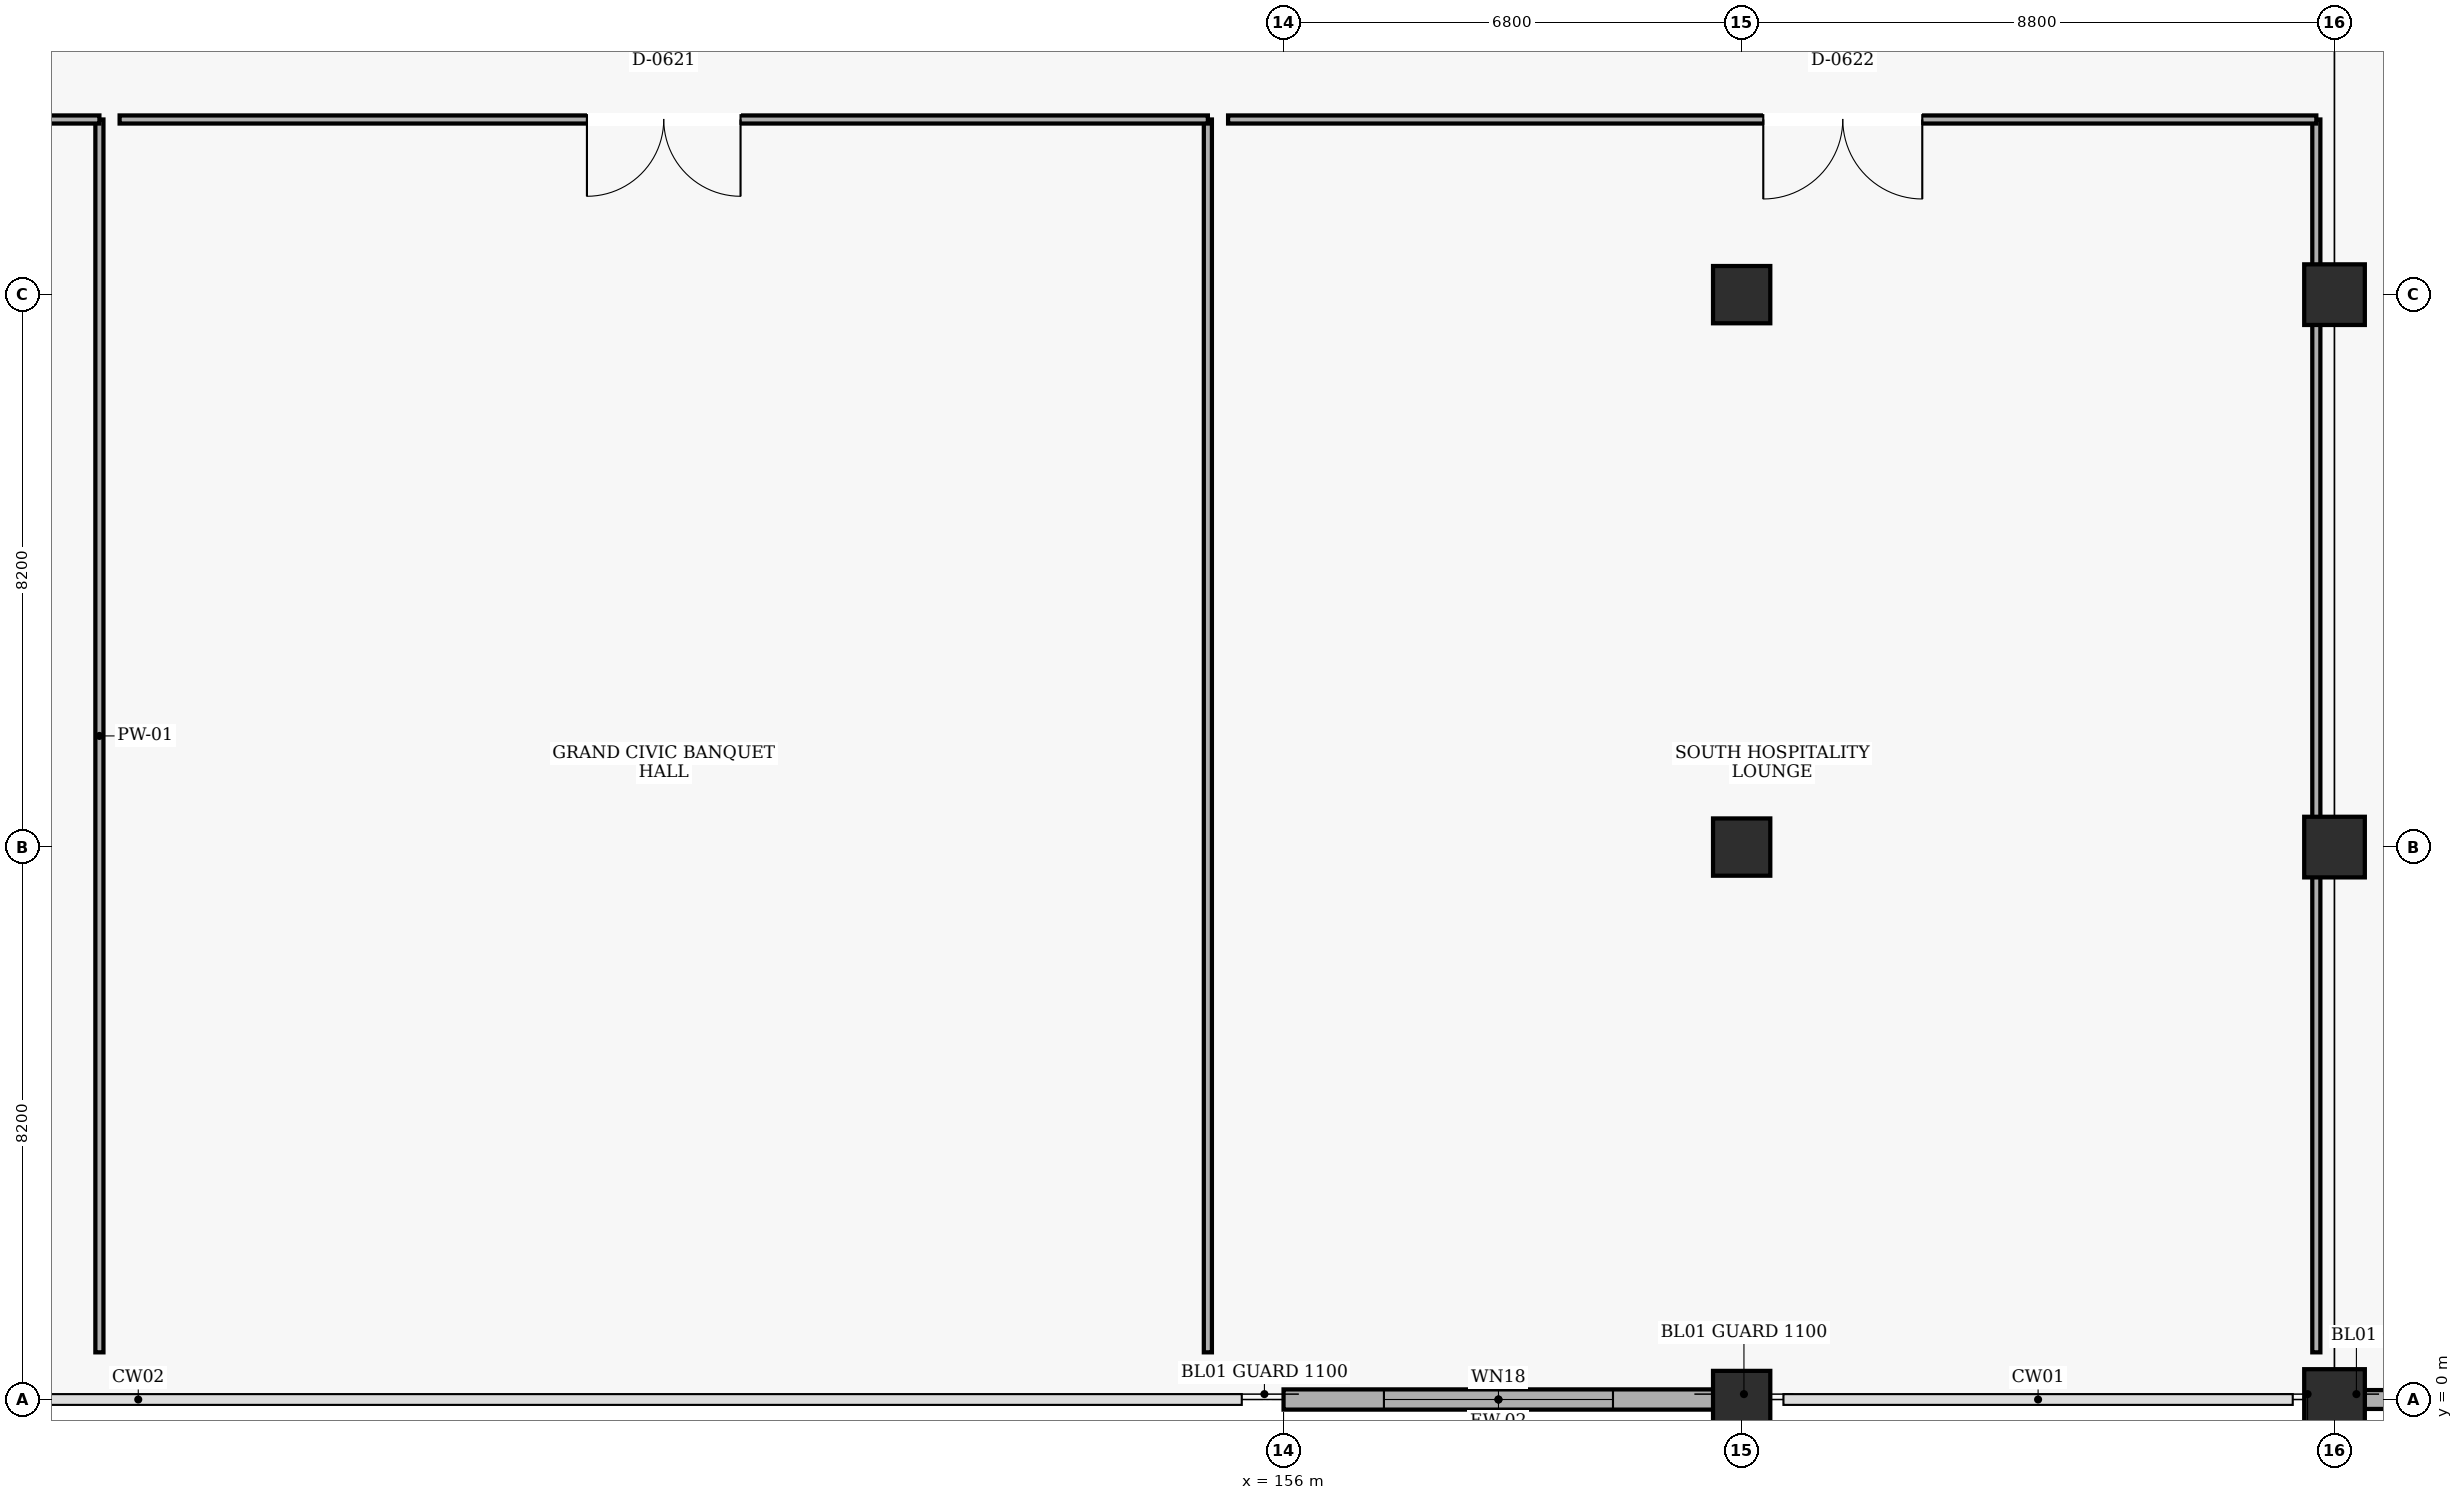
"""IFC4 building model, lengths in metres.
Left out: names, types, materials, properties, quantities, classifications, styles, units other than length and angle.
Written with IfcOpenShell. Run it as: python <this file> out.ifc"""

import sys

from ifc_helpers import new_model, si_unit, direction, frame, frame_2d, origin, origin_2d, place, context, subcontext, project, spatial, rectangle, extrude, element, fill, save


model = new_model("IFC4")
c1 = context("Model", 3, precision=1e-05, world=origin(), true_north=direction((0.0, 1.0)))
c2 = subcontext(c1, "Body", "Model", "MODEL_VIEW")
j1 = project(units=[si_unit("LENGTHUNIT", "METRE"), si_unit("PLANEANGLEUNIT", "RADIAN")], contexts=[c1])
p1 = place(None, origin())
s1 = spatial("IfcSite", under=j1, at=p1, CompositionType="ELEMENT")
p2 = place(p1, origin())
s2 = spatial("IfcBuilding", under=s1, at=p2, CompositionType="ELEMENT")
p3 = place(p2, frame((0.0, 0.0, 10.2)))
s3 = spatial("IfcBuildingStorey", under=s2, at=p3, CompositionType="ELEMENT", Elevation=10.2)
for number, where, z_axis, x_axis in (
    (1, (162.8, 0.0, 0.0), (0.0, 0.0, 1.0), (1.0, 0.0, 0.0)),
    (2, (162.8, 8.2, 0.0), (0.0, 0.0, 1.0), (1.0, 0.0, 0.0)),
    (3, (162.8, 16.4, 0.0), (0.0, 0.0, 1.0), (1.0, 0.0, 0.0)),
):
    element("IfcColumn", number, at=place(p3, frame(where, z_axis=z_axis, x_axis=x_axis)), inside=s3, PredefinedType="COLUMN", context=c2, shape_type="SweptSolid", body=[
        extrude(rectangle(XDim=0.85, YDim=0.85, at=origin_2d()), origin(), (0.0, 0.0, 1.0), 4.8),
    ])
for number, where, z_axis, x_axis in (
    (4, (171.6, 0.0, 0.0), (0.0, 0.0, 1.0), (1.0, 0.0, 0.0)),
    (5, (171.6, 8.2, 0.0), (0.0, 0.0, 1.0), (1.0, 0.0, 0.0)),
    (6, (171.6, 16.4, 0.0), (0.0, 0.0, 1.0), (1.0, 0.0, 0.0)),
):
    element("IfcColumn", number, at=place(p3, frame(where, z_axis=z_axis, x_axis=x_axis)), inside=s3, PredefinedType="COLUMN", context=c2, shape_type="SweptSolid", body=[
        extrude(rectangle(XDim=0.9, YDim=0.9, at=origin_2d()), origin(), (0.0, 0.0, 1.0), 4.8),
    ])
p4 = place(p3, frame((179.905, 0.0, 0.0), z_axis=(0.0, 0.0, 1.0), x_axis=(-1.0, 0.0, 0.0)))
e7 = element("IfcWall", 7, at=p4, inside=s3, PredefinedType="SOLIDWALL", context=c2, shape_type="SweptSolid", body=[
    extrude(rectangle(XDim=7.86, YDim=0.28, at=frame_2d((3.93, 0.0))), origin(), (0.0, 0.0, 1.0), 3.86),
])
p5 = place(p4, frame((2.43, 0.0, 0.9)))
e8 = element("IfcOpeningElement", 8, at=p5, cuts=e7, PredefinedType="OPENING", context=c2, shape_type="SweptSolid", body=[
    extrude(rectangle(XDim=3.0, YDim=2.1, at=frame_2d((1.5, 1.05))), frame((0.0, 0.15, 0.0), z_axis=(0.0, -1.0, 0.0), x_axis=(1.0, 0.0, 0.0)), (0.0, 0.0, 1.0), 0.3),
])
p6 = place(p3, frame((162.38, 0.0, 0.0), z_axis=(0.0, 0.0, 1.0), x_axis=(-1.0, 0.0, 0.0)))
e9 = element("IfcWall", 9, at=p6, inside=s3, PredefinedType="SOLIDWALL", context=c2, shape_type="SweptSolid", body=[
    extrude(rectangle(XDim=6.38, YDim=0.3, at=frame_2d((3.19, 0.0))), origin(), (0.0, 0.0, 1.0), 4.48),
])
p7 = place(p6, frame((1.49, 0.0, 0.9)))
e10 = element("IfcOpeningElement", 10, at=p7, cuts=e9, PredefinedType="OPENING", context=c2, shape_type="SweptSolid", body=[
    extrude(rectangle(XDim=3.4, YDim=2.1, at=frame_2d((1.7, 1.05))), frame((0.0, 0.16, 0.0), z_axis=(0.0, -1.0, 0.0), x_axis=(1.0, 0.0, 0.0)), (0.0, 0.0, 1.0), 0.32),
])
p8 = place(p3, frame((138.423, 0.7, 0.0), z_axis=(0.0, 0.0, 1.0), x_axis=(0.0, 1.0, 0.0)))
e11 = element("IfcWall", 11, at=p8, inside=s3, PredefinedType="PARTITIONING", context=c2, shape_type="SweptSolid", body=[
    extrude(rectangle(XDim=18.3, YDim=0.12, at=frame_2d((9.15, 0.0))), origin(), (0.0, 0.0, 1.0), 4.48),
])
p9 = place(p3, frame((138.423, 19.0, 0.0), z_axis=(0.0, 0.0, 1.0), x_axis=(-1.0, 0.0, 0.0)))
e12 = element("IfcWall", 12, at=p9, inside=s3, PredefinedType="PARTITIONING", context=c2, shape_type="SweptSolid", body=[
    extrude(rectangle(XDim=16.153, YDim=0.12, at=frame_2d((8.077, 0.0))), origin(), (0.0, 0.0, 1.0), 4.48),
])
p10 = place(p9, frame((6.997, 0.0, 0.0)))
e13 = element("IfcOpeningElement", 13, at=p10, cuts=e12, PredefinedType="OPENING", context=c2, shape_type="SweptSolid", body=[
    extrude(rectangle(XDim=2.16, YDim=2.35, at=frame_2d((1.08, 1.175))), frame((0.0, 0.07, 0.0), z_axis=(0.0, -1.0, 0.0), x_axis=(1.0, 0.0, 0.0)), (0.0, 0.0, 1.0), 0.14),
])
p11 = place(p3, frame((154.877, 0.7, 0.0), z_axis=(0.0, 0.0, 1.0), x_axis=(0.0, 1.0, 0.0)))
e14 = element("IfcWall", 14, at=p11, inside=s3, PredefinedType="PARTITIONING", context=c2, shape_type="SweptSolid", body=[
    extrude(rectangle(XDim=18.3, YDim=0.12, at=frame_2d((9.15, 0.0))), origin(), (0.0, 0.0, 1.0), 4.48),
])
p12 = place(p3, frame((154.877, 19.0, 0.0), z_axis=(0.0, 0.0, 1.0), x_axis=(-1.0, 0.0, 0.0)))
e15 = element("IfcWall", 15, at=p12, inside=s3, PredefinedType="PARTITIONING", context=c2, shape_type="SweptSolid", body=[
    extrude(rectangle(XDim=16.153, YDim=0.12, at=frame_2d((8.077, 0.0))), origin(), (0.0, 0.0, 1.0), 4.48),
])
p13 = place(p12, frame((6.937, 0.0, 0.0)))
e16 = element("IfcOpeningElement", 16, at=p13, cuts=e15, PredefinedType="OPENING", context=c2, shape_type="SweptSolid", body=[
    extrude(rectangle(XDim=2.28, YDim=2.4, at=frame_2d((1.14, 1.2))), frame((0.0, 0.07, 0.0), z_axis=(0.0, -1.0, 0.0), x_axis=(1.0, 0.0, 0.0)), (0.0, 0.0, 1.0), 0.14),
])
p14 = place(p3, frame((171.33, 0.7, 0.0), z_axis=(0.0, 0.0, 1.0), x_axis=(0.0, 1.0, 0.0)))
e17 = element("IfcWall", 17, at=p14, inside=s3, PredefinedType="PARTITIONING", context=c2, shape_type="SweptSolid", body=[
    extrude(rectangle(XDim=18.3, YDim=0.12, at=frame_2d((9.15, 0.0))), origin(), (0.0, 0.0, 1.0), 3.76),
])
p15 = place(p3, frame((171.33, 19.0, 0.0), z_axis=(0.0, 0.0, 1.0), x_axis=(-1.0, 0.0, 0.0)))
e18 = element("IfcWall", 18, at=p15, inside=s3, PredefinedType="PARTITIONING", context=c2, shape_type="SweptSolid", body=[
    extrude(rectangle(XDim=16.153, YDim=0.12, at=frame_2d((8.077, 0.0))), origin(), (0.0, 0.0, 1.0), 4.48),
])
p16 = place(p15, frame((5.849, 0.0, 0.0)))
e19 = element("IfcOpeningElement", 19, at=p16, cuts=e18, PredefinedType="OPENING", context=c2, shape_type="SweptSolid", body=[
    extrude(rectangle(XDim=2.36, YDim=2.4, at=frame_2d((1.18, 1.2))), frame((0.0, 0.07, 0.0), z_axis=(0.0, -1.0, 0.0), x_axis=(1.0, 0.0, 0.0)), (0.0, 0.0, 1.0), 0.14),
])
p17 = place(p7, origin())
e20 = element("IfcWindow", 20, at=p17, inside=s3, PartitioningType="SINGLE_PANEL", PredefinedType="WINDOW", context=c2, shape_type="SweptSolid", body=[
    extrude(rectangle(XDim=3.4, YDim=2.1, at=frame_2d((1.7, 1.05))), frame((0.0, 0.03, 0.0), z_axis=(0.0, -1.0, 0.0), x_axis=(1.0, 0.0, 0.0)), (0.0, 0.0, 1.0), 0.06),
])
fill(e10, e20)
p18 = place(p13, origin())
e21 = element("IfcDoor", 21, at=p18, inside=s3, OperationType="DOUBLE_DOOR_SINGLE_SWING", PredefinedType="DOOR", context=c2, shape_type="SweptSolid", body=[
    extrude(rectangle(XDim=2.28, YDim=2.4, at=frame_2d((1.14, 1.2))), frame((0.0, 0.025, 0.0), z_axis=(0.0, -1.0, 0.0), x_axis=(1.0, 0.0, 0.0)), (0.0, 0.0, 1.0), 0.05),
])
fill(e16, e21)
p19 = place(p16, origin())
e22 = element("IfcDoor", 22, at=p19, inside=s3, OperationType="DOUBLE_DOOR_SINGLE_SWING", PredefinedType="DOOR", context=c2, shape_type="SweptSolid", body=[
    extrude(rectangle(XDim=2.36, YDim=2.4, at=frame_2d((1.18, 1.2))), frame((0.0, 0.025, 0.0), z_axis=(0.0, -1.0, 0.0), x_axis=(1.0, 0.0, 0.0)), (0.0, 0.0, 1.0), 0.05),
])
fill(e19, e22)
save(model, sys.argv[1])
